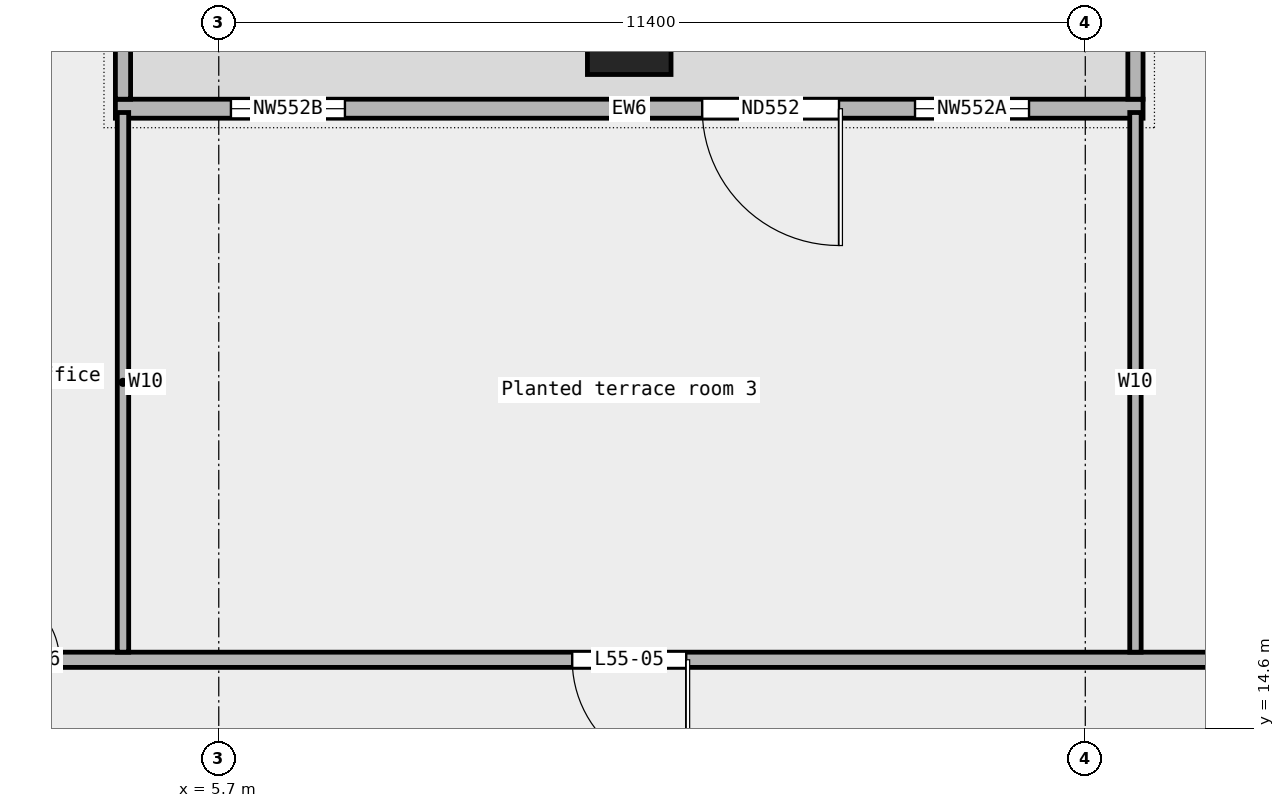
"""IFC4 building model, lengths in metres.
Left out: names, types, materials, properties, quantities, classifications, styles, units other than length and angle.
Written with IfcOpenShell. Run it as: python <this file> out.ifc"""

import sys

from ifc_helpers import new_model, si_unit, direction, frame, frame_2d, origin, origin_2d, place, context, subcontext, project, spatial, rectangle, extrude, element, fill, save


model = new_model("IFC4")
c1 = context("Model", 3, precision=1e-05, world=origin(), true_north=direction((0.0, 1.0)))
c2 = subcontext(c1, "Body", "Model", "MODEL_VIEW")
j1 = project(units=[si_unit("LENGTHUNIT", "METRE"), si_unit("PLANEANGLEUNIT", "RADIAN")], contexts=[c1])
p1 = place(None, origin())
s1 = spatial("IfcSite", under=j1, at=p1, CompositionType="ELEMENT")
p2 = place(p1, origin())
s2 = spatial("IfcBuilding", under=s1, at=p2, CompositionType="ELEMENT")
p3 = place(p2, frame((0.0, 0.0, 255.0)))
s3 = spatial("IfcBuildingStorey", under=s2, at=p3, CompositionType="ELEMENT", Elevation=255.0)
p4 = place(p3, frame((11.1, 23.75, 0.0), z_axis=(0.0, 0.0, 1.0), x_axis=(1.0, 0.0, 0.0)))
e1 = element("IfcColumn", 1, at=p4, inside=s3, PredefinedType="COLUMN", context=c2, shape_type="SweptSolid", body=[
    extrude(rectangle(XDim=1.1, YDim=1.1, at=origin_2d()), origin(), (0.0, 0.0, 1.0), 3.4),
])
p5 = place(p3, frame((17.86, 22.75, 0.0), z_axis=(0.0, 0.0, 1.0), x_axis=(-1.0, 0.0, 0.0)))
e2 = element("IfcWall", 2, at=p5, inside=s3, PredefinedType="STANDARD", context=c2, shape_type="SweptSolid", body=[
    extrude(rectangle(XDim=13.52, YDim=0.25, at=frame_2d((6.76, 0.0))), origin(), (0.0, 0.0, 1.0), 3.4),
])
p6 = place(p5, frame((1.5, 0.0, 0.45)))
e3 = element("IfcOpeningElement", 3, at=p6, cuts=e2, PredefinedType="OPENING", context=c2, shape_type="SweptSolid", body=[
    extrude(rectangle(XDim=1.5, YDim=2.4, at=frame_2d((0.75, 1.2))), frame((0.0, 0.137, 0.0), z_axis=(0.0, -1.0, 0.0), x_axis=(1.0, 0.0, 0.0)), (0.0, 0.0, 1.0), 0.274),
])
p7 = place(p5, frame((4.0, 0.0, 0.0)))
e4 = element("IfcOpeningElement", 4, at=p7, cuts=e2, PredefinedType="OPENING", context=c2, shape_type="SweptSolid", body=[
    extrude(rectangle(XDim=1.8, YDim=2.4, at=frame_2d((0.9, 1.2))), frame((0.0, 0.137, 0.0), z_axis=(0.0, -1.0, 0.0), x_axis=(1.0, 0.0, 0.0)), (0.0, 0.0, 1.0), 0.274),
])
p8 = place(p5, frame((10.5, 0.0, 0.45)))
e5 = element("IfcOpeningElement", 5, at=p8, cuts=e2, PredefinedType="OPENING", context=c2, shape_type="SweptSolid", body=[
    extrude(rectangle(XDim=1.5, YDim=2.4, at=frame_2d((0.75, 1.2))), frame((0.0, 0.137, 0.0), z_axis=(0.0, -1.0, 0.0), x_axis=(1.0, 0.0, 0.0)), (0.0, 0.0, 1.0), 0.274),
])
for number, where, z_axis, x_axis in (
    (6, (17.76, 24.75, 0.0), (0.0, 0.0, 1.0), (0.0, -1.0, 0.0)),
    (7, (4.44, 24.75, 0.0), (0.0, 0.0, 1.0), (0.0, -1.0, 0.0)),
):
    element("IfcWall", number, at=place(p3, frame(where, z_axis=z_axis, x_axis=x_axis)), inside=s3, PredefinedType="STANDARD", context=c2, shape_type="SweptSolid", body=[
        extrude(rectangle(XDim=1.875, YDim=0.2, at=frame_2d((0.938, 0.0))), origin(), (0.0, 0.0, 1.0), 3.4),
    ])
p9 = place(p3, frame((-28.15, 15.5, 0.0), z_axis=(0.0, 0.0, 1.0), x_axis=(1.0, 0.0, 0.0)))
e8 = element("IfcWall", 8, at=p9, inside=s3, PredefinedType="PARTITIONING", context=c2, shape_type="SweptSolid", body=[
    extrude(rectangle(XDim=56.3, YDim=0.2, at=frame_2d((28.15, 0.0))), origin(), (0.0, 0.0, 1.0), 3.4),
])
p10 = place(p9, frame((50.405, 0.0, 0.0)))
e9 = element("IfcOpeningElement", 9, at=p10, cuts=e8, PredefinedType="OPENING", context=c2, shape_type="SweptSolid", body=[
    extrude(rectangle(XDim=1.2, YDim=2.1, at=frame_2d((0.6, 1.05))), frame((0.0, 0.112, 0.0), z_axis=(0.0, -1.0, 0.0), x_axis=(1.0, 0.0, 0.0)), (0.0, 0.0, 1.0), 0.224),
])
p11 = place(p9, frame((38.5, 0.0, 0.0)))
e10 = element("IfcOpeningElement", 10, at=p11, cuts=e8, PredefinedType="OPENING", context=c2, shape_type="SweptSolid", body=[
    extrude(rectangle(XDim=1.5, YDim=2.1, at=frame_2d((0.75, 1.05))), frame((0.0, 0.112, 0.0), z_axis=(0.0, -1.0, 0.0), x_axis=(1.0, 0.0, 0.0)), (0.0, 0.0, 1.0), 0.224),
])
p12 = place(p9, frame((30.853, 0.0, 0.0)))
e11 = element("IfcOpeningElement", 11, at=p12, cuts=e8, PredefinedType="OPENING", context=c2, shape_type="SweptSolid", body=[
    extrude(rectangle(XDim=0.9, YDim=2.1, at=frame_2d((0.45, 1.05))), frame((0.0, 0.112, 0.0), z_axis=(0.0, -1.0, 0.0), x_axis=(1.0, 0.0, 0.0)), (0.0, 0.0, 1.0), 0.224),
])
p13 = place(p9, frame((19.798, 0.0, 0.0)))
e12 = element("IfcOpeningElement", 12, at=p13, cuts=e8, PredefinedType="OPENING", context=c2, shape_type="SweptSolid", body=[
    extrude(rectangle(XDim=1.8, YDim=2.1, at=frame_2d((0.9, 1.05))), frame((0.0, 0.112, 0.0), z_axis=(0.0, -1.0, 0.0), x_axis=(1.0, 0.0, 0.0)), (0.0, 0.0, 1.0), 0.224),
])
p14 = place(p9, frame((5.04, 0.0, 0.0)))
e13 = element("IfcOpeningElement", 13, at=p14, cuts=e8, PredefinedType="OPENING", context=c2, shape_type="SweptSolid", body=[
    extrude(rectangle(XDim=1.5, YDim=2.1, at=frame_2d((0.75, 1.05))), frame((0.0, 0.112, 0.0), z_axis=(0.0, -1.0, 0.0), x_axis=(1.0, 0.0, 0.0)), (0.0, 0.0, 1.0), 0.224),
])
for number, where, z_axis, x_axis in (
    (14, (4.44, 15.6, 0.0), (0.0, 0.0, 1.0), (0.0, 1.0, 0.0)),
    (15, (17.76, 15.6, 0.0), (0.0, 0.0, 1.0), (0.0, 1.0, 0.0)),
):
    element("IfcWall", number, at=place(p3, frame(where, z_axis=z_axis, x_axis=x_axis)), inside=s3, PredefinedType="PARTITIONING", context=c2, shape_type="SweptSolid", body=[
        extrude(rectangle(XDim=7.1, YDim=0.15, at=frame_2d((3.55, 0.0))), origin(), (0.0, 0.0, 1.0), 3.4),
    ])
p15 = place(p6, origin())
e16 = element("IfcWindow", 16, at=p15, inside=s3, PartitioningType="SINGLE_PANEL", PredefinedType="WINDOW", context=c2, shape_type="SweptSolid", body=[
    extrude(rectangle(XDim=1.5, YDim=2.4, at=frame_2d((0.75, 1.2))), frame((0.0, 0.03, 0.0), z_axis=(0.0, -1.0, 0.0), x_axis=(1.0, 0.0, 0.0)), (0.0, 0.0, 1.0), 0.06),
])
fill(e3, e16)
p16 = place(p7, origin())
e17 = element("IfcDoor", 17, at=p16, inside=s3, OperationType="DOUBLE_DOOR_SINGLE_SWING", PredefinedType="DOOR", context=c2, shape_type="SweptSolid", body=[
    extrude(rectangle(XDim=1.8, YDim=2.4, at=frame_2d((0.9, 1.2))), frame((0.0, 0.025, 0.0), z_axis=(0.0, -1.0, 0.0), x_axis=(1.0, 0.0, 0.0)), (0.0, 0.0, 1.0), 0.05),
])
fill(e4, e17)
p17 = place(p8, origin())
e18 = element("IfcWindow", 18, at=p17, inside=s3, PartitioningType="SINGLE_PANEL", PredefinedType="WINDOW", context=c2, shape_type="SweptSolid", body=[
    extrude(rectangle(XDim=1.5, YDim=2.4, at=frame_2d((0.75, 1.2))), frame((0.0, 0.03, 0.0), z_axis=(0.0, -1.0, 0.0), x_axis=(1.0, 0.0, 0.0)), (0.0, 0.0, 1.0), 0.06),
])
fill(e5, e18)
p18 = place(p11, origin())
e19 = element("IfcDoor", 19, at=p18, inside=s3, OperationType="DOUBLE_DOOR_SINGLE_SWING", PredefinedType="DOOR", context=c2, shape_type="SweptSolid", body=[
    extrude(rectangle(XDim=1.5, YDim=2.1, at=frame_2d((0.75, 1.05))), frame((0.0, 0.025, 0.0), z_axis=(0.0, -1.0, 0.0), x_axis=(1.0, 0.0, 0.0)), (0.0, 0.0, 1.0), 0.05),
])
fill(e10, e19)
p19 = place(p12, origin())
e20 = element("IfcDoor", 20, at=p19, inside=s3, OperationType="SINGLE_SWING_LEFT", PredefinedType="DOOR", context=c2, shape_type="SweptSolid", body=[
    extrude(rectangle(XDim=0.9, YDim=2.1, at=frame_2d((0.45, 1.05))), frame((0.0, 0.025, 0.0), z_axis=(0.0, -1.0, 0.0), x_axis=(1.0, 0.0, 0.0)), (0.0, 0.0, 1.0), 0.05),
])
fill(e11, e20)
save(model, sys.argv[1])
